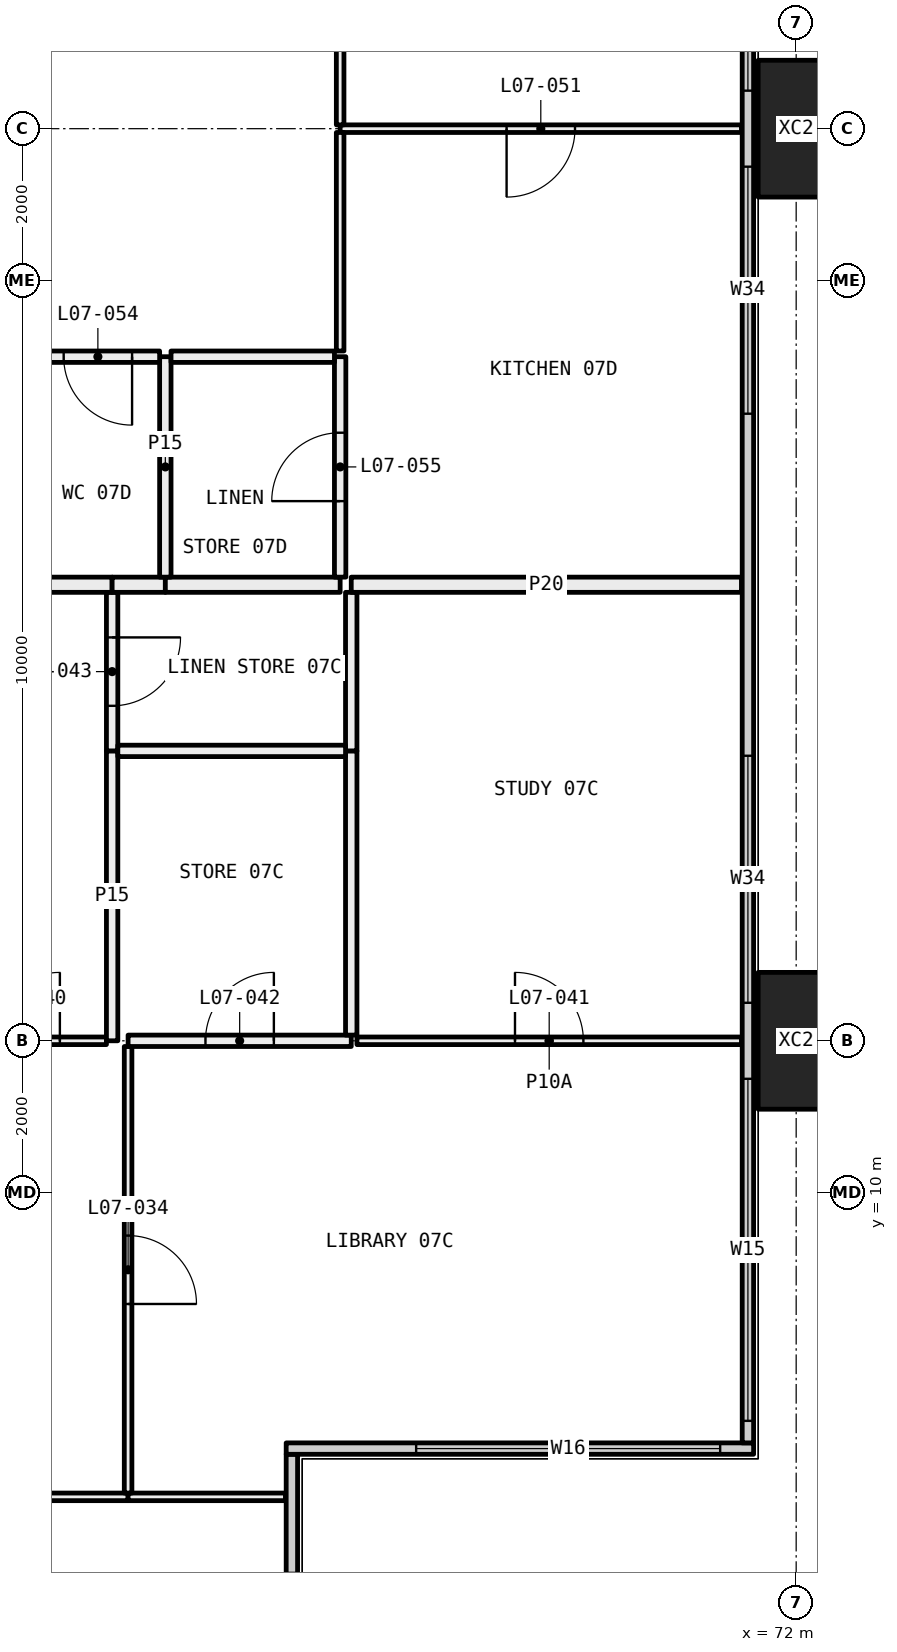
"""IFC4 building model, lengths in metres.
Left out: names, types, materials, properties, quantities, classifications, styles, units other than length and angle.
Written with IfcOpenShell. Run it as: python <this file> out.ifc"""

import sys

from ifc_helpers import new_model, si_unit, direction, frame, frame_2d, origin, origin_2d, place, context, subcontext, project, spatial, rectangle, hollow_rectangle, extrude, element, fill, save


model = new_model("IFC4")
c1 = context("Model", 3, precision=1e-05, world=origin(), true_north=direction((0.0, 1.0)))
c2 = subcontext(c1, "Body", "Model", "MODEL_VIEW")
j1 = project(units=[si_unit("LENGTHUNIT", "METRE"), si_unit("PLANEANGLEUNIT", "RADIAN")], contexts=[c1])
p1 = place(None, origin())
s1 = spatial("IfcSite", under=j1, at=p1, CompositionType="ELEMENT")
p2 = place(p1, origin())
s2 = spatial("IfcBuilding", under=s1, at=p2, CompositionType="ELEMENT")
p3 = place(p2, frame((0.0, 0.0, 36.9)))
s3 = spatial("IfcBuildingStorey", under=s2, at=p3, CompositionType="ELEMENT", Elevation=36.9)
for number, where, z_axis, x_axis in (
    (1, (72.0, 12.0, -0.4), (0.0, 0.0, 1.0), (0.0, 1.0, 0.0)),
    (2, (72.0, 24.0, -0.4), (0.0, 0.0, 1.0), (0.0, 1.0, 0.0)),
):
    element("IfcColumn", number, at=place(p3, frame(where, z_axis=z_axis, x_axis=x_axis)), inside=s3, PredefinedType="COLUMN", context=c2, shape_type="SweptSolid", body=[
        extrude(hollow_rectangle(XDim=1.8, YDim=1.0, WallThickness=0.07, at=origin_2d()), origin(), (0.0, 0.0, 1.0), 3.45),
    ])
p4 = place(p3, frame((65.365, 0.71, 0.0), z_axis=(0.0, 0.0, 1.0), x_axis=(0.0, 1.0, 0.0)))
e3 = element("IfcWall", 3, at=p4, inside=s3, PredefinedType="ELEMENTEDWALL", context=c2, shape_type="SweptSolid", body=[
    extrude(rectangle(XDim=5.85, YDim=0.15, at=frame_2d((2.925, 0.0))), origin(), (0.0, 0.0, 1.0), 3.05),
])
p5 = place(p4, frame((0.29, 0.0, 0.45)))
e4 = element("IfcOpeningElement", 4, at=p5, cuts=e3, PredefinedType="OPENING", context=c2, shape_type="SweptSolid", body=[
    extrude(rectangle(XDim=4.0, YDim=2.55, at=frame_2d((2.0, 1.275))), frame((0.0, 0.085, 0.0), z_axis=(0.0, -1.0, 0.0), x_axis=(1.0, 0.0, 0.0)), (0.0, 0.0, 1.0), 0.17),
])
p6 = place(p3, frame((65.29, 6.635, 0.0), z_axis=(0.0, 0.0, 1.0), x_axis=(1.0, 0.0, 0.0)))
e5 = element("IfcWall", 5, at=p6, inside=s3, PredefinedType="ELEMENTEDWALL", context=c2, shape_type="SweptSolid", body=[
    extrude(rectangle(XDim=6.15, YDim=0.15, at=frame_2d((3.075, 0.0))), origin(), (0.0, 0.0, 1.0), 3.05),
])
p7 = place(p6, frame((1.71, 0.0, 0.45)))
e6 = element("IfcOpeningElement", 6, at=p7, cuts=e5, PredefinedType="OPENING", context=c2, shape_type="SweptSolid", body=[
    extrude(rectangle(XDim=4.0, YDim=2.55, at=frame_2d((2.0, 1.275))), frame((0.0, 0.085, 0.0), z_axis=(0.0, -1.0, 0.0), x_axis=(1.0, 0.0, 0.0)), (0.0, 0.0, 1.0), 0.17),
])
p8 = place(p3, frame((71.365, 6.71, 0.0), z_axis=(0.0, 0.0, 1.0), x_axis=(0.0, 1.0, 0.0)))
e7 = element("IfcWall", 7, at=p8, inside=s3, PredefinedType="ELEMENTEDWALL", context=c2, shape_type="SweptSolid", body=[
    extrude(rectangle(XDim=34.58, YDim=0.15, at=frame_2d((17.29, 0.0))), origin(), (0.0, 0.0, 1.0), 3.05),
])
p9 = place(p8, frame((0.29, 0.0, 0.45)))
e8 = element("IfcOpeningElement", 8, at=p9, cuts=e7, PredefinedType="OPENING", context=c2, shape_type="SweptSolid", body=[
    extrude(rectangle(XDim=4.5, YDim=2.55, at=frame_2d((2.25, 1.275))), frame((0.0, 0.085, 0.0), z_axis=(0.0, -1.0, 0.0), x_axis=(1.0, 0.0, 0.0)), (0.0, 0.0, 1.0), 0.17),
])
p10 = place(p8, frame((5.79, 0.0, 0.45)))
e9 = element("IfcOpeningElement", 9, at=p10, cuts=e7, PredefinedType="OPENING", context=c2, shape_type="SweptSolid", body=[
    extrude(rectangle(XDim=3.25, YDim=2.55, at=frame_2d((1.625, 1.275))), frame((0.0, 0.085, 0.0), z_axis=(0.0, -1.0, 0.0), x_axis=(1.0, 0.0, 0.0)), (0.0, 0.0, 1.0), 0.17),
])
p11 = place(p8, frame((13.54, 0.0, 0.45)))
e10 = element("IfcOpeningElement", 10, at=p11, cuts=e7, PredefinedType="OPENING", context=c2, shape_type="SweptSolid", body=[
    extrude(rectangle(XDim=3.25, YDim=2.55, at=frame_2d((1.625, 1.275))), frame((0.0, 0.085, 0.0), z_axis=(0.0, -1.0, 0.0), x_axis=(1.0, 0.0, 0.0)), (0.0, 0.0, 1.0), 0.17),
])
p12 = place(p8, frame((17.79, 0.0, 0.45)))
e11 = element("IfcOpeningElement", 11, at=p12, cuts=e7, PredefinedType="OPENING", context=c2, shape_type="SweptSolid", body=[
    extrude(rectangle(XDim=3.25, YDim=2.55, at=frame_2d((1.625, 1.275))), frame((0.0, 0.085, 0.0), z_axis=(0.0, -1.0, 0.0), x_axis=(1.0, 0.0, 0.0)), (0.0, 0.0, 1.0), 0.17),
])
p13 = place(p8, frame((26.79, 0.0, 0.45)))
e12 = element("IfcOpeningElement", 12, at=p13, cuts=e7, PredefinedType="OPENING", context=c2, shape_type="SweptSolid", body=[
    extrude(rectangle(XDim=2.0, YDim=2.55, at=frame_2d((1.0, 1.275))), frame((0.0, 0.085, 0.0), z_axis=(0.0, -1.0, 0.0), x_axis=(1.0, 0.0, 0.0)), (0.0, 0.0, 1.0), 0.17),
])
p14 = place(p8, frame((29.79, 0.0, 0.45)))
e13 = element("IfcOpeningElement", 13, at=p14, cuts=e7, PredefinedType="OPENING", context=c2, shape_type="SweptSolid", body=[
    extrude(rectangle(XDim=4.5, YDim=2.55, at=frame_2d((2.25, 1.275))), frame((0.0, 0.085, 0.0), z_axis=(0.0, -1.0, 0.0), x_axis=(1.0, 0.0, 0.0)), (0.0, 0.0, 1.0), 0.17),
])
p15 = place(p3, frame((63.21, 6.0, 0.0), z_axis=(0.0, 0.0, 1.0), x_axis=(-1.0, 0.0, 0.0)))
e14 = element("IfcWall", 14, at=p15, inside=s3, PredefinedType="PARTITIONING", context=c2, shape_type="SweptSolid", body=[
    extrude(rectangle(XDim=3.16, YDim=0.1, at=frame_2d((1.58, 0.0))), origin(), (0.0, 0.0, 1.0), 2.45),
])
p16 = place(p3, frame((65.28, 6.0, 0.0), z_axis=(0.0, 0.0, 1.0), x_axis=(-1.0, 0.0, 0.0)))
e15 = element("IfcWall", 15, at=p16, inside=s3, PredefinedType="PARTITIONING", context=c2, shape_type="SweptSolid", body=[
    extrude(rectangle(XDim=2.07, YDim=0.1, at=frame_2d((1.035, 0.0))), origin(), (0.0, 0.0, 1.0), 3.05),
])
p17 = place(p3, frame((63.21, 6.05, 0.0), z_axis=(0.0, 0.0, 1.0), x_axis=(0.0, 1.0, 0.0)))
e16 = element("IfcWall", 16, at=p17, inside=s3, PredefinedType="PARTITIONING", context=c2, shape_type="SweptSolid", body=[
    extrude(rectangle(XDim=5.875, YDim=0.1, at=frame_2d((2.938, 0.0))), origin(), (0.0, 0.0, 1.0), 2.45),
])
p18 = place(p17, frame((2.488, 0.0, 0.0)))
e17 = element("IfcOpeningElement", 17, at=p18, cuts=e16, PredefinedType="OPENING", context=c2, shape_type="SweptSolid", body=[
    extrude(rectangle(XDim=0.9, YDim=2.1, at=frame_2d((0.45, 1.05))), frame((0.0, 0.06, 0.0), z_axis=(0.0, -1.0, 0.0), x_axis=(1.0, 0.0, 0.0)), (0.0, 0.0, 1.0), 0.12),
])
p19 = place(p3, frame((62.925, 12.0, 0.0), z_axis=(0.0, 0.0, 1.0), x_axis=(-1.0, 0.0, 0.0)))
e18 = element("IfcWall", 18, at=p19, inside=s3, PredefinedType="PARTITIONING", context=c2, shape_type="SweptSolid", body=[
    extrude(rectangle(XDim=2.125, YDim=0.1, at=frame_2d((1.062, 0.0))), origin(), (0.0, 0.0, 1.0), 2.45),
])
p20 = place(p19, frame((0.613, 0.0, 0.0)))
e19 = element("IfcOpeningElement", 19, at=p20, cuts=e18, PredefinedType="OPENING", context=c2, shape_type="SweptSolid", body=[
    extrude(rectangle(XDim=0.9, YDim=2.1, at=frame_2d((0.45, 1.05))), frame((0.0, 0.06, 0.0), z_axis=(0.0, -1.0, 0.0), x_axis=(1.0, 0.0, 0.0)), (0.0, 0.0, 1.0), 0.12),
])
p21 = place(p3, frame((71.28, 12.0, 0.0), z_axis=(0.0, 0.0, 1.0), x_axis=(-1.0, 0.0, 0.0)))
e20 = element("IfcWall", 20, at=p21, inside=s3, PredefinedType="PARTITIONING", context=c2, shape_type="SweptSolid", body=[
    extrude(rectangle(XDim=5.059, YDim=0.1, at=frame_2d((2.53, 0.0))), origin(), (0.0, 0.0, 1.0), 2.45),
])
p22 = place(p21, frame((2.08, 0.0, 0.0)))
e21 = element("IfcOpeningElement", 21, at=p22, cuts=e20, PredefinedType="OPENING", context=c2, shape_type="SweptSolid", body=[
    extrude(rectangle(XDim=0.9, YDim=2.1, at=frame_2d((0.45, 1.05))), frame((0.0, 0.06, 0.0), z_axis=(0.0, -1.0, 0.0), x_axis=(1.0, 0.0, 0.0)), (0.0, 0.0, 1.0), 0.12),
])
p23 = place(p3, frame((66.146, 12.0, 0.0), z_axis=(0.0, 0.0, 1.0), x_axis=(-1.0, 0.0, 0.0)))
e22 = element("IfcWall", 22, at=p23, inside=s3, PredefinedType="PARTITIONING", context=c2, shape_type="SweptSolid", body=[
    extrude(rectangle(XDim=2.936, YDim=0.15, at=frame_2d((1.468, 0.0))), origin(), (0.0, 0.0, 1.0), 2.45),
])
p24 = place(p23, frame((1.018, 0.0, 0.0)))
e23 = element("IfcOpeningElement", 23, at=p24, cuts=e22, PredefinedType="OPENING", context=c2, shape_type="SweptSolid", body=[
    extrude(rectangle(XDim=0.9, YDim=2.1, at=frame_2d((0.45, 1.05))), frame((0.0, 0.085, 0.0), z_axis=(0.0, -1.0, 0.0), x_axis=(1.0, 0.0, 0.0)), (0.0, 0.0, 1.0), 0.17),
])
p25 = place(p3, frame((63.0, 12.0, 0.0), z_axis=(0.0, 0.0, 1.0), x_axis=(0.0, 1.0, 0.0)))
e24 = element("IfcWall", 24, at=p25, inside=s3, PredefinedType="PARTITIONING", context=c2, shape_type="SweptSolid", body=[
    extrude(rectangle(XDim=3.814, YDim=0.15, at=frame_2d((1.907, 0.0))), origin(), (0.0, 0.0, 1.0), 2.45),
])
p26 = place(p3, frame((63.0, 15.814, 0.0), z_axis=(0.0, 0.0, 1.0), x_axis=(0.0, 1.0, 0.0)))
e25 = element("IfcWall", 25, at=p26, inside=s3, PredefinedType="PARTITIONING", context=c2, shape_type="SweptSolid", body=[
    extrude(rectangle(XDim=2.086, YDim=0.15, at=frame_2d((1.043, 0.0))), origin(), (0.0, 0.0, 1.0), 3.05),
])
p27 = place(p26, frame((0.593, 0.0, 0.0)))
e26 = element("IfcOpeningElement", 26, at=p27, cuts=e25, PredefinedType="OPENING", context=c2, shape_type="SweptSolid", body=[
    extrude(rectangle(XDim=0.9, YDim=2.1, at=frame_2d((0.45, 1.05))), frame((0.0, 0.085, 0.0), z_axis=(0.0, -1.0, 0.0), x_axis=(1.0, 0.0, 0.0)), (0.0, 0.0, 1.0), 0.17),
])
p28 = place(p3, frame((63.0, 18.0, 0.0), z_axis=(0.0, 0.0, 1.0), x_axis=(-1.0, 0.0, 0.0)))
e27 = element("IfcWall", 27, at=p28, inside=s3, PredefinedType="PARTITIONING", context=c2, shape_type="SweptSolid", body=[
    extrude(rectangle(XDim=1.1, YDim=0.2, at=frame_2d((0.55, 0.0))), origin(), (0.0, 0.0, 1.0), 3.05),
])
p29 = place(p3, frame((66.146, 15.814, 0.0), z_axis=(0.0, 0.0, 1.0), x_axis=(0.0, -1.0, 0.0)))
e28 = element("IfcWall", 28, at=p29, inside=s3, PredefinedType="PARTITIONING", context=c2, shape_type="SweptSolid", body=[
    extrude(rectangle(XDim=3.739, YDim=0.15, at=frame_2d((1.87, 0.0))), origin(), (0.0, 0.0, 1.0), 2.45),
])
p30 = place(p3, frame((66.146, 17.9, 0.0), z_axis=(0.0, 0.0, 1.0), x_axis=(0.0, -1.0, 0.0)))
e29 = element("IfcWall", 29, at=p30, inside=s3, PredefinedType="PARTITIONING", context=c2, shape_type="SweptSolid", body=[
    extrude(rectangle(XDim=2.086, YDim=0.15, at=frame_2d((1.043, 0.0))), origin(), (0.0, 0.0, 1.0), 2.55),
])
p31 = place(p3, frame((71.28, 18.0, 0.0), z_axis=(0.0, 0.0, 1.0), x_axis=(-1.0, 0.0, 0.0)))
e30 = element("IfcWall", 30, at=p31, inside=s3, PredefinedType="PARTITIONING", context=c2, shape_type="SweptSolid", body=[
    extrude(rectangle(XDim=5.134, YDim=0.2, at=frame_2d((2.567, 0.0))), origin(), (0.0, 0.0, 1.0), 3.05),
])
p32 = place(p3, frame((66.071, 15.814, 0.0), z_axis=(0.0, 0.0, 1.0), x_axis=(-1.0, 0.0, 0.0)))
e31 = element("IfcWall", 31, at=p32, inside=s3, PredefinedType="PARTITIONING", context=c2, shape_type="SweptSolid", body=[
    extrude(rectangle(XDim=2.996, YDim=0.15, at=frame_2d((1.498, 0.0))), origin(), (0.0, 0.0, 1.0), 3.05),
])
p33 = place(p3, frame((63.7, 18.0, 0.0), z_axis=(0.0, 0.0, 1.0), x_axis=(-1.0, 0.0, 0.0)))
e32 = element("IfcWall", 32, at=p33, inside=s3, PredefinedType="PARTITIONING", context=c2, shape_type="SweptSolid", body=[
    extrude(rectangle(XDim=0.7, YDim=0.2, at=frame_2d((0.35, 0.0))), origin(), (0.0, 0.0, 1.0), 3.05),
])
p34 = place(p3, frame((66.0, 18.0, 0.0), z_axis=(0.0, 0.0, 1.0), x_axis=(-1.0, 0.0, 0.0)))
e33 = element("IfcWall", 33, at=p34, inside=s3, PredefinedType="PARTITIONING", context=c2, shape_type="SweptSolid", body=[
    extrude(rectangle(XDim=2.3, YDim=0.2, at=frame_2d((1.15, 0.0))), origin(), (0.0, 0.0, 1.0), 3.05),
])
p35 = place(p3, frame((71.28, 24.0, 0.0), z_axis=(0.0, 0.0, 1.0), x_axis=(-1.0, 0.0, 0.0)))
e34 = element("IfcWall", 34, at=p35, inside=s3, PredefinedType="PARTITIONING", context=c2, shape_type="SweptSolid", body=[
    extrude(rectangle(XDim=5.28, YDim=0.1, at=frame_2d((2.64, 0.0))), origin(), (0.0, 0.0, 1.0), 2.45),
])
p36 = place(p35, frame((2.19, 0.0, 0.0)))
e35 = element("IfcOpeningElement", 35, at=p36, cuts=e34, PredefinedType="OPENING", context=c2, shape_type="SweptSolid", body=[
    extrude(rectangle(XDim=0.9, YDim=2.1, at=frame_2d((0.45, 1.05))), frame((0.0, 0.06, 0.0), z_axis=(0.0, -1.0, 0.0), x_axis=(1.0, 0.0, 0.0)), (0.0, 0.0, 1.0), 0.12),
])
p37 = place(p3, frame((66.0, 21.0, 0.0), z_axis=(0.0, 0.0, 1.0), x_axis=(0.0, -1.0, 0.0)))
e36 = element("IfcWall", 36, at=p37, inside=s3, PredefinedType="PARTITIONING", context=c2, shape_type="SweptSolid", body=[
    extrude(rectangle(XDim=2.9, YDim=0.15, at=frame_2d((1.45, 0.0))), origin(), (0.0, 0.0, 1.0), 3.05),
])
p38 = place(p37, frame((1.0, 0.0, 0.0)))
e37 = element("IfcOpeningElement", 37, at=p38, cuts=e36, PredefinedType="OPENING", context=c2, shape_type="SweptSolid", body=[
    extrude(rectangle(XDim=0.9, YDim=2.1, at=frame_2d((0.45, 1.05))), frame((0.0, 0.085, 0.0), z_axis=(0.0, -1.0, 0.0), x_axis=(1.0, 0.0, 0.0)), (0.0, 0.0, 1.0), 0.17),
])
p39 = place(p3, frame((66.0, 23.95, 0.0), z_axis=(0.0, 0.0, 1.0), x_axis=(0.0, -1.0, 0.0)))
e38 = element("IfcWall", 38, at=p39, inside=s3, PredefinedType="PARTITIONING", context=c2, shape_type="SweptSolid", body=[
    extrude(rectangle(XDim=2.875, YDim=0.1, at=frame_2d((1.438, 0.0))), origin(), (0.0, 0.0, 1.0), 2.45),
])
p40 = place(p3, frame((66.0, 33.0, 0.0), z_axis=(0.0, 0.0, 1.0), x_axis=(0.0, -1.0, 0.0)))
e39 = element("IfcWall", 39, at=p40, inside=s3, PredefinedType="PARTITIONING", context=c2, shape_type="SweptSolid", body=[
    extrude(rectangle(XDim=8.95, YDim=0.1, at=frame_2d((4.475, 0.0))), origin(), (0.0, 0.0, 1.0), 2.45),
])
p41 = place(p3, frame((63.7, 18.1, 0.0), z_axis=(0.0, 0.0, 1.0), x_axis=(0.0, 1.0, 0.0)))
e40 = element("IfcWall", 40, at=p41, inside=s3, PredefinedType="PARTITIONING", context=c2, shape_type="SweptSolid", body=[
    extrude(rectangle(XDim=2.9, YDim=0.15, at=frame_2d((1.45, 0.0))), origin(), (0.0, 0.0, 1.0), 3.05),
])
p42 = place(p3, frame((63.625, 21.0, 0.0), z_axis=(0.0, 0.0, 1.0), x_axis=(-1.0, 0.0, 0.0)))
e41 = element("IfcWall", 41, at=p42, inside=s3, PredefinedType="PARTITIONING", context=c2, shape_type="SweptSolid", body=[
    extrude(rectangle(XDim=1.625, YDim=0.15, at=frame_2d((0.812, 0.0))), origin(), (0.0, 0.0, 1.0), 3.05),
])
p43 = place(p42, frame((0.363, 0.0, 0.0)))
e42 = element("IfcOpeningElement", 42, at=p43, cuts=e41, PredefinedType="OPENING", context=c2, shape_type="SweptSolid", body=[
    extrude(rectangle(XDim=0.9, YDim=2.1, at=frame_2d((0.45, 1.05))), frame((0.0, 0.085, 0.0), z_axis=(0.0, -1.0, 0.0), x_axis=(1.0, 0.0, 0.0)), (0.0, 0.0, 1.0), 0.17),
])
p44 = place(p3, frame((65.925, 21.0, 0.0), z_axis=(0.0, 0.0, 1.0), x_axis=(-1.0, 0.0, 0.0)))
e43 = element("IfcWall", 43, at=p44, inside=s3, PredefinedType="PARTITIONING", context=c2, shape_type="SweptSolid", body=[
    extrude(rectangle(XDim=2.15, YDim=0.15, at=frame_2d((1.075, 0.0))), origin(), (0.0, 0.0, 1.0), 3.05),
])
p45 = place(p7, origin())
e44 = element("IfcWindow", 44, at=p45, inside=s3, PartitioningType="SINGLE_PANEL", PredefinedType="WINDOW", context=c2, shape_type="SweptSolid", body=[
    extrude(rectangle(XDim=4.0, YDim=2.55, at=frame_2d((2.0, 1.275))), frame((0.0, 0.03, 0.0), z_axis=(0.0, -1.0, 0.0), x_axis=(1.0, 0.0, 0.0)), (0.0, 0.0, 1.0), 0.06),
])
fill(e6, e44)
p46 = place(p9, origin())
e45 = element("IfcWindow", 45, at=p46, inside=s3, PartitioningType="SINGLE_PANEL", PredefinedType="WINDOW", context=c2, shape_type="SweptSolid", body=[
    extrude(rectangle(XDim=4.5, YDim=2.55, at=frame_2d((2.25, 1.275))), frame((0.0, 0.03, 0.0), z_axis=(0.0, -1.0, 0.0), x_axis=(1.0, 0.0, 0.0)), (0.0, 0.0, 1.0), 0.06),
])
fill(e8, e45)
p47 = place(p10, origin())
e46 = element("IfcWindow", 46, at=p47, inside=s3, PartitioningType="SINGLE_PANEL", PredefinedType="WINDOW", context=c2, shape_type="SweptSolid", body=[
    extrude(rectangle(XDim=3.25, YDim=2.55, at=frame_2d((1.625, 1.275))), frame((0.0, 0.03, 0.0), z_axis=(0.0, -1.0, 0.0), x_axis=(1.0, 0.0, 0.0)), (0.0, 0.0, 1.0), 0.06),
])
fill(e9, e46)
p48 = place(p11, origin())
e47 = element("IfcWindow", 47, at=p48, inside=s3, PartitioningType="SINGLE_PANEL", PredefinedType="WINDOW", context=c2, shape_type="SweptSolid", body=[
    extrude(rectangle(XDim=3.25, YDim=2.55, at=frame_2d((1.625, 1.275))), frame((0.0, 0.03, 0.0), z_axis=(0.0, -1.0, 0.0), x_axis=(1.0, 0.0, 0.0)), (0.0, 0.0, 1.0), 0.06),
])
fill(e10, e47)
p49 = place(p12, origin())
e48 = element("IfcWindow", 48, at=p49, inside=s3, PartitioningType="SINGLE_PANEL", PredefinedType="WINDOW", context=c2, shape_type="SweptSolid", body=[
    extrude(rectangle(XDim=3.25, YDim=2.55, at=frame_2d((1.625, 1.275))), frame((0.0, 0.03, 0.0), z_axis=(0.0, -1.0, 0.0), x_axis=(1.0, 0.0, 0.0)), (0.0, 0.0, 1.0), 0.06),
])
fill(e11, e48)
p50 = place(p18, frame((0.9, 0.0, 0.0), x_axis=(-1.0, 0.0, 0.0)))
e49 = element("IfcDoor", 49, at=p50, inside=s3, OperationType="SINGLE_SWING_LEFT", PredefinedType="DOOR", context=c2, shape_type="SweptSolid", body=[
    extrude(rectangle(XDim=0.9, YDim=2.1, at=frame_2d((0.45, 1.05))), frame((0.0, 0.025, 0.0), z_axis=(0.0, -1.0, 0.0), x_axis=(1.0, 0.0, 0.0)), (0.0, 0.0, 1.0), 0.05),
])
fill(e17, e49)
p51 = place(p20, frame((0.9, 0.0, 0.0), x_axis=(-1.0, 0.0, 0.0)))
e50 = element("IfcDoor", 50, at=p51, inside=s3, OperationType="SINGLE_SWING_LEFT", PredefinedType="DOOR", context=c2, shape_type="SweptSolid", body=[
    extrude(rectangle(XDim=0.9, YDim=2.1, at=frame_2d((0.45, 1.05))), frame((0.0, 0.025, 0.0), z_axis=(0.0, -1.0, 0.0), x_axis=(1.0, 0.0, 0.0)), (0.0, 0.0, 1.0), 0.05),
])
fill(e19, e50)
p52 = place(p22, frame((0.9, 0.0, 0.0), x_axis=(-1.0, 0.0, 0.0)))
e51 = element("IfcDoor", 51, at=p52, inside=s3, OperationType="SINGLE_SWING_RIGHT", PredefinedType="DOOR", context=c2, shape_type="SweptSolid", body=[
    extrude(rectangle(XDim=0.9, YDim=2.1, at=frame_2d((0.45, 1.05))), frame((0.0, 0.025, 0.0), z_axis=(0.0, -1.0, 0.0), x_axis=(1.0, 0.0, 0.0)), (0.0, 0.0, 1.0), 0.05),
])
fill(e21, e51)
p53 = place(p24, frame((0.9, 0.0, 0.0), x_axis=(-1.0, 0.0, 0.0)))
e52 = element("IfcDoor", 52, at=p53, inside=s3, OperationType="SINGLE_SWING_LEFT", PredefinedType="DOOR", context=c2, shape_type="SweptSolid", body=[
    extrude(rectangle(XDim=0.9, YDim=2.1, at=frame_2d((0.45, 1.05))), frame((0.0, 0.025, 0.0), z_axis=(0.0, -1.0, 0.0), x_axis=(1.0, 0.0, 0.0)), (0.0, 0.0, 1.0), 0.05),
])
fill(e23, e52)
p54 = place(p27, frame((0.9, 0.0, 0.0), x_axis=(-1.0, 0.0, 0.0)))
e53 = element("IfcDoor", 53, at=p54, inside=s3, OperationType="SINGLE_SWING_RIGHT", PredefinedType="DOOR", context=c2, shape_type="SweptSolid", body=[
    extrude(rectangle(XDim=0.9, YDim=2.1, at=frame_2d((0.45, 1.05))), frame((0.0, 0.025, 0.0), z_axis=(0.0, -1.0, 0.0), x_axis=(1.0, 0.0, 0.0)), (0.0, 0.0, 1.0), 0.05),
])
fill(e26, e53)
p55 = place(p36, origin())
e54 = element("IfcDoor", 54, at=p55, inside=s3, OperationType="SINGLE_SWING_LEFT", PredefinedType="DOOR", context=c2, shape_type="SweptSolid", body=[
    extrude(rectangle(XDim=0.9, YDim=2.1, at=frame_2d((0.45, 1.05))), frame((0.0, 0.025, 0.0), z_axis=(0.0, -1.0, 0.0), x_axis=(1.0, 0.0, 0.0)), (0.0, 0.0, 1.0), 0.05),
])
fill(e35, e54)
p56 = place(p43, origin())
e55 = element("IfcDoor", 55, at=p56, inside=s3, OperationType="SINGLE_SWING_RIGHT", PredefinedType="DOOR", context=c2, shape_type="SweptSolid", body=[
    extrude(rectangle(XDim=0.9, YDim=2.1, at=frame_2d((0.45, 1.05))), frame((0.0, 0.025, 0.0), z_axis=(0.0, -1.0, 0.0), x_axis=(1.0, 0.0, 0.0)), (0.0, 0.0, 1.0), 0.05),
])
fill(e42, e55)
p57 = place(p38, frame((0.9, 0.0, 0.0), x_axis=(-1.0, 0.0, 0.0)))
e56 = element("IfcDoor", 56, at=p57, inside=s3, OperationType="SINGLE_SWING_RIGHT", PredefinedType="DOOR", context=c2, shape_type="SweptSolid", body=[
    extrude(rectangle(XDim=0.9, YDim=2.1, at=frame_2d((0.45, 1.05))), frame((0.0, 0.025, 0.0), z_axis=(0.0, -1.0, 0.0), x_axis=(1.0, 0.0, 0.0)), (0.0, 0.0, 1.0), 0.05),
])
fill(e37, e56)
save(model, sys.argv[1])
